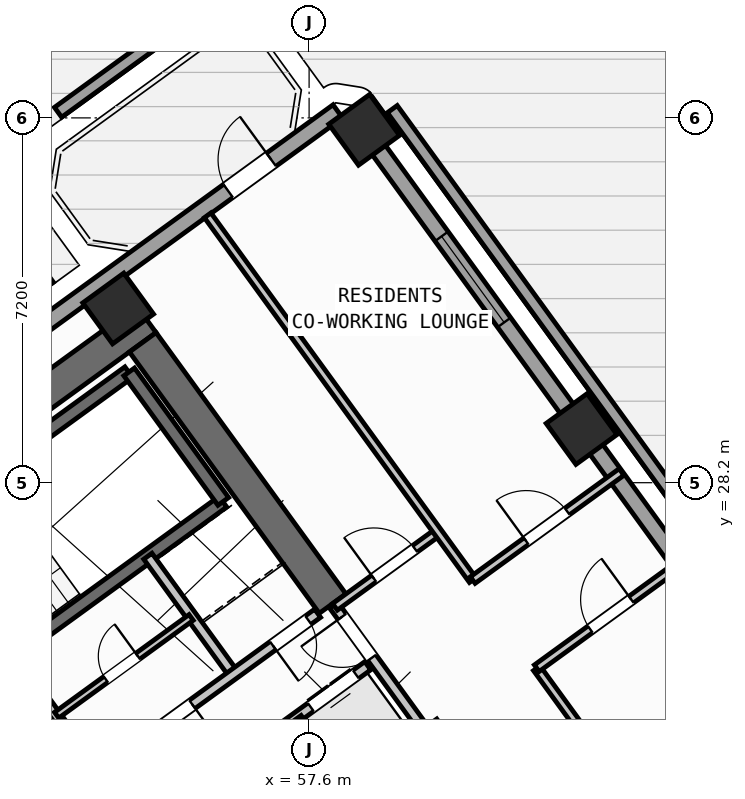
"""IFC4 building model, lengths in metres.
Left out: names, types, materials, properties, quantities, classifications, styles, units other than length and angle.
Written with IfcOpenShell. Run it as: python <this file> out.ifc"""

import sys

from ifc_helpers import new_model, si_unit, direction, frame, frame_2d, origin, origin_2d, place, context, subcontext, project, spatial, rectangle, hollow_rectangle, extrude, source, transform, mapped, element, fill, save


model = new_model("IFC4")
c1 = context("Model", 3, precision=1e-05, world=origin(), true_north=direction((0.0, 1.0)))
c2 = subcontext(c1, "Body", "Model", "MODEL_VIEW")
j1 = project(units=[si_unit("LENGTHUNIT", "METRE"), si_unit("PLANEANGLEUNIT", "RADIAN")], contexts=[c1])
p1 = place(None, origin())
s1 = spatial("IfcSite", under=j1, at=p1, CompositionType="ELEMENT")
p2 = place(p1, origin())
s2 = spatial("IfcBuilding", under=s1, at=p2, CompositionType="ELEMENT")
p3 = place(p2, frame((0.0, 0.0, 24.0)))
s3 = spatial("IfcBuildingStorey", under=s2, at=p3, CompositionType="ELEMENT", Elevation=24.0)
p4 = place(p3, frame((44.325, 24.113, 0.0), z_axis=(0.0, 0.0, 1.0), x_axis=(0.809012664862, 0.58779121131, 0.0)))
e1 = element("IfcWall", 1, at=p4, inside=s3, PredefinedType="SHEAR", context=c2, shape_type="SweptSolid", body=[
    extrude(rectangle(XDim=12.44, YDim=0.65, at=frame_2d((6.22, 0.0))), origin(), (0.0, 0.0, 1.0), 3.35),
])
p5 = place(p3, frame((58.064, 25.813, 0.0), z_axis=(0.0, 0.0, 1.0), x_axis=(-0.58777996584, 0.809020835181, 0.0)))
e2 = element("IfcWall", 2, at=p5, inside=s3, PredefinedType="SHEAR", context=c2, shape_type="SweptSolid", body=[
    extrude(rectangle(XDim=6.375, YDim=0.65, at=frame_2d((3.188, 0.0))), origin(), (0.0, 0.0, 1.0), 3.35),
])
m1 = source(origin(), c2, "Body", "SweptSolid", [
    extrude(hollow_rectangle(XDim=1.0, YDim=1.0, WallThickness=0.04, at=origin_2d()), origin(), (0.0, 0.0, 1.0), 3.6),
])
for number, where, z_axis, x_axis in (
    (3, (53.832, 31.638, 0.0), (0.0, 0.0, 1.0), (0.809, 0.588, 0.0)),
    (4, (62.977, 29.259, 0.0), (0.0, 0.0, 1.0), (0.809, 0.588, 0.0)),
    (5, (58.686, 35.165, 0.0), (0.0, 0.0, 1.0), (0.809, 0.588, 0.0)),
):
    element("IfcColumn", number, at=place(p3, frame(where, z_axis=z_axis, x_axis=x_axis)), inside=s3, PredefinedType="COLUMN", context=c2, shape_type="MappedRepresentation", body=[
        mapped(m1, transform((0.0, 0.0, 0.0), scale=1.0)),
    ])
p6 = place(p3, frame((70.18, 20.52, 0.0), z_axis=(0.0, 0.0, 1.0), x_axis=(-0.587784691012, 0.809017402169, 0.0)))
e6 = element("IfcWall", 6, at=p6, inside=s3, PredefinedType="PARAPET", context=c2, shape_type="SweptSolid", body=[
    extrude(rectangle(XDim=18.608, YDim=0.24, at=frame_2d((9.304, 0.0))), origin(), (0.0, 0.0, 1.0), 1.15),
])
p7 = place(p3, frame((55.143, 37.325, 0.0), z_axis=(0.0, 0.0, 1.0), x_axis=(-0.808999321839, -0.587809575682, 0.0)))
e7 = element("IfcWall", 7, at=p7, inside=s3, PredefinedType="PARAPET", context=c2, shape_type="SweptSolid", body=[
    extrude(rectangle(XDim=3.087, YDim=0.24, at=frame_2d((1.543, 0.0))), origin(), (0.0, 0.0, 1.0), 1.15),
])
p8 = place(p3, frame((52.483, 32.253, 0.0), z_axis=(0.0, 0.0, 1.0), x_axis=(-0.809025796011, -0.58777313769, 0.0)))
e8 = element("IfcWall", 8, at=p8, inside=s3, PredefinedType="PARAPET", context=c2, shape_type="SweptSolid", body=[
    extrude(rectangle(XDim=10.674, YDim=0.24, at=frame_2d((5.337, 0.0))), origin(), (0.0, 0.0, 1.0), 1.15),
])
p9 = place(p3, frame((43.938, 25.192, 0.0), z_axis=(0.0, 0.0, 1.0), x_axis=(0.809016324578, 0.587786174187, 0.0)))
e9 = element("IfcWall", 9, at=p9, inside=s3, PredefinedType="STANDARD", context=c2, shape_type="SweptSolid", body=[
    extrude(rectangle(XDim=17.587, YDim=0.32, at=frame_2d((8.794, 0.0))), origin(), (0.0, 0.0, 1.0), 3.35),
])
p10 = place(p9, frame((14.914, 0.0, 0.0)))
e10 = element("IfcOpeningElement", 10, at=p10, cuts=e9, PredefinedType="OPENING", context=c2, shape_type="SweptSolid", body=[
    extrude(rectangle(XDim=1.05, YDim=2.15, at=frame_2d((0.525, 1.075))), frame((0.0, 0.17, 0.0), z_axis=(0.0, -1.0, 0.0), x_axis=(1.0, 0.0, 0.0)), (0.0, 0.0, 1.0), 0.34),
])
p11 = place(p9, frame((2.169, 0.0, 0.8)))
e11 = element("IfcOpeningElement", 11, at=p11, cuts=e9, PredefinedType="OPENING", context=c2, shape_type="SweptSolid", body=[
    extrude(rectangle(XDim=2.1, YDim=1.55, at=frame_2d((1.05, 0.775))), frame((0.0, 0.17, 0.0), z_axis=(0.0, -1.0, 0.0), x_axis=(1.0, 0.0, 0.0)), (0.0, 0.0, 1.0), 0.34),
])
p12 = place(p9, frame((7.319, 0.0, 0.8)))
e12 = element("IfcOpeningElement", 12, at=p12, cuts=e9, PredefinedType="OPENING", context=c2, shape_type="SweptSolid", body=[
    extrude(rectangle(XDim=2.1, YDim=1.55, at=frame_2d((1.05, 0.775))), frame((0.0, 0.17, 0.0), z_axis=(0.0, -1.0, 0.0), x_axis=(1.0, 0.0, 0.0)), (0.0, 0.0, 1.0), 0.34),
])
p13 = place(p3, frame((58.455, 35.484, 0.0), z_axis=(0.0, 0.0, 1.0), x_axis=(0.587783625747, -0.809018176127, 0.0)))
e13 = element("IfcWall", 13, at=p13, inside=s3, PredefinedType="STANDARD", context=c2, shape_type="SweptSolid", body=[
    extrude(rectangle(XDim=21.587, YDim=0.32, at=frame_2d((10.794, 0.0))), origin(), (0.0, 0.0, 1.0), 2.725),
])
p14 = place(p13, frame((2.994, 0.0, 0.8)))
e14 = element("IfcOpeningElement", 14, at=p14, cuts=e13, PredefinedType="OPENING", context=c2, shape_type="SweptSolid", body=[
    extrude(rectangle(XDim=2.1, YDim=1.55, at=frame_2d((1.05, 0.775))), frame((0.0, 0.17, 0.0), z_axis=(0.0, -1.0, 0.0), x_axis=(1.0, 0.0, 0.0)), (0.0, 0.0, 1.0), 0.34),
])
p15 = place(p13, frame((11.934, 0.0, 0.85)))
e15 = element("IfcOpeningElement", 15, at=p15, cuts=e13, PredefinedType="OPENING", context=c2, shape_type="SweptSolid", body=[
    extrude(rectangle(XDim=1.8, YDim=1.5, at=frame_2d((0.9, 0.75))), frame((0.0, 0.17, 0.0), z_axis=(0.0, -1.0, 0.0), x_axis=(1.0, 0.0, 0.0)), (0.0, 0.0, 1.0), 0.34),
])
p16 = place(p3, frame((48.006, 25.996, 0.0), z_axis=(0.0, 0.0, 1.0), x_axis=(0.80901903764, 0.587782439969, 0.0)))
e16 = element("IfcWall", 16, at=p16, inside=s3, PredefinedType="SHEAR", context=c2, shape_type="SweptSolid", body=[
    extrude(rectangle(XDim=7.46, YDim=0.26, at=frame_2d((3.73, 0.0))), origin(), (0.0, 0.0, 1.0), 3.35),
])
p17 = place(p3, frame((49.863, 23.44, 0.0), z_axis=(0.0, 0.0, 1.0), x_axis=(0.809003474932, 0.587803859759, 0.0)))
e17 = element("IfcWall", 17, at=p17, inside=s3, PredefinedType="SHEAR", context=c2, shape_type="SweptSolid", body=[
    extrude(rectangle(XDim=7.46, YDim=0.26, at=frame_2d((3.73, 0.0))), origin(), (0.0, 0.0, 1.0), 3.35),
])
p18 = place(p17, frame((0.36, 0.0, 0.0)))
e18 = element("IfcOpeningElement", 18, at=p18, cuts=e17, PredefinedType="OPENING", context=c2, shape_type="SweptSolid", body=[
    extrude(rectangle(XDim=0.86, YDim=2.05, at=frame_2d((0.43, 1.025))), frame((0.0, 0.14, 0.0), z_axis=(0.0, -1.0, 0.0), x_axis=(1.0, 0.0, 0.0)), (0.0, 0.0, 1.0), 0.28),
])
p19 = place(p3, frame((55.906, 27.831, 0.0), z_axis=(0.0, 0.0, 1.0), x_axis=(-0.587804123638, 0.809003283204, 0.0)))
e19 = element("IfcWall", 19, at=p19, inside=s3, PredefinedType="SHEAR", context=c2, shape_type="SweptSolid", body=[
    extrude(rectangle(XDim=3.16, YDim=0.26, at=frame_2d((1.58, 0.0))), origin(), (0.0, 0.0, 1.0), 3.35),
])
p20 = place(p3, frame((54.421, 21.436, 0.0), z_axis=(0.0, 0.0, 1.0), x_axis=(0.809013710463, 0.587789772183, 0.0)))
e20 = element("IfcWall", 20, at=p20, inside=s3, PredefinedType="STANDARD", context=c2, shape_type="SweptSolid", body=[
    extrude(rectangle(XDim=5.36, YDim=0.2, at=frame_2d((2.68, 0.0))), origin(), (0.0, 0.0, 1.0), 3.34),
])
p21 = place(p20, frame((0.37, 0.0, 0.0)))
e21 = element("IfcOpeningElement", 21, at=p21, cuts=e20, PredefinedType="OPENING", context=c2, shape_type="SweptSolid", body=[
    extrude(rectangle(XDim=1.1, YDim=2.15, at=frame_2d((0.55, 1.075))), frame((0.0, 0.11, 0.0), z_axis=(0.0, -1.0, 0.0), x_axis=(1.0, 0.0, 0.0)), (0.0, 0.0, 1.0), 0.22),
])
p22 = place(p20, frame((2.17, 0.0, 0.0)))
e22 = element("IfcOpeningElement", 22, at=p22, cuts=e20, PredefinedType="OPENING", context=c2, shape_type="SweptSolid", body=[
    extrude(rectangle(XDim=1.1, YDim=2.15, at=frame_2d((0.55, 1.075))), frame((0.0, 0.11, 0.0), z_axis=(0.0, -1.0, 0.0), x_axis=(1.0, 0.0, 0.0)), (0.0, 0.0, 1.0), 0.22),
])
p23 = place(p20, frame((3.97, 0.0, 0.0)))
e23 = element("IfcOpeningElement", 23, at=p23, cuts=e20, PredefinedType="OPENING", context=c2, shape_type="SweptSolid", body=[
    extrude(rectangle(XDim=1.1, YDim=2.15, at=frame_2d((0.55, 1.075))), frame((0.0, 0.11, 0.0), z_axis=(0.0, -1.0, 0.0), x_axis=(1.0, 0.0, 0.0)), (0.0, 0.0, 1.0), 0.22),
])
p24 = place(p3, frame((58.29, 22.27, 0.0), z_axis=(0.0, 0.0, 1.0), x_axis=(-0.587840865826, 0.808976585857, 0.0)))
e24 = element("IfcWall", 24, at=p24, inside=s3, PredefinedType="STANDARD", context=c2, shape_type="SweptSolid", body=[
    extrude(rectangle(XDim=1.58, YDim=0.2, at=frame_2d((0.79, 0.0))), origin(), (0.0, 0.0, 1.0), 3.34),
])
p25 = place(p3, frame((53.425, 22.468, 0.0), z_axis=(0.0, 0.0, 1.0), x_axis=(-0.5877230039, 0.809062216821, 0.0)))
e25 = element("IfcWall", 25, at=p25, inside=s3, PredefinedType="STANDARD", context=c2, shape_type="SweptSolid", body=[
    extrude(rectangle(XDim=2.88, YDim=0.2, at=frame_2d((1.44, 0.0))), origin(), (0.0, 0.0, 1.0), 3.34),
])
p26 = place(p3, frame((56.111, 24.419, 0.0), z_axis=(0.0, 0.0, 1.0), x_axis=(-0.58777848983, 0.809021907548, 0.0)))
e26 = element("IfcWall", 26, at=p26, inside=s3, PredefinedType="STANDARD", context=c2, shape_type="SweptSolid", body=[
    extrude(rectangle(XDim=2.88, YDim=0.2, at=frame_2d((1.44, 0.0))), origin(), (0.0, 0.0, 1.0), 3.34),
])
p27 = place(p3, frame((53.425, 22.468, 0.0), z_axis=(0.0, 0.0, 1.0), x_axis=(0.80902705128, 0.587771409902, 0.0)))
e27 = element("IfcWall", 27, at=p27, inside=s3, PredefinedType="STANDARD", context=c2, shape_type="SweptSolid", body=[
    extrude(rectangle(XDim=5.368, YDim=0.2, at=frame_2d((2.684, 0.0))), origin(), (0.0, 0.0, 1.0), 3.34),
])
p28 = place(p27, frame((4.28, 0.0, 0.0)))
e28 = element("IfcOpeningElement", 28, at=p28, cuts=e27, PredefinedType="OPENING", context=c2, shape_type="SweptSolid", body=[
    extrude(rectangle(XDim=0.86, YDim=2.05, at=frame_2d((0.43, 1.025))), frame((0.0, 0.11, 0.0), z_axis=(0.0, -1.0, 0.0), x_axis=(1.0, 0.0, 0.0)), (0.0, 0.0, 1.0), 0.22),
])
p29 = place(p27, frame((1.45, 0.0, 0.0)))
e29 = element("IfcOpeningElement", 29, at=p29, cuts=e27, PredefinedType="OPENING", context=c2, shape_type="SweptSolid", body=[
    extrude(rectangle(XDim=0.86, YDim=2.05, at=frame_2d((0.43, 1.025))), frame((0.0, 0.11, 0.0), z_axis=(0.0, -1.0, 0.0), x_axis=(1.0, 0.0, 0.0)), (0.0, 0.0, 1.0), 0.22),
])
p30 = place(p3, frame((52.618, 23.612, 0.0), z_axis=(0.0, 0.0, 1.0), x_axis=(0.809009587469, 0.587795446889, 0.0)))
e30 = element("IfcWall", 30, at=p30, inside=s3, PredefinedType="PLUMBINGWALL", context=c2, shape_type="SweptSolid", body=[
    extrude(rectangle(XDim=3.28, YDim=0.14, at=frame_2d((1.64, 0.0))), origin(), (0.0, 0.0, 1.0), 3.34),
])
p31 = place(p30, frame((1.2, 0.0, 0.0)))
e31 = element("IfcOpeningElement", 31, at=p31, cuts=e30, PredefinedType="OPENING", context=c2, shape_type="SweptSolid", body=[
    extrude(rectangle(XDim=0.78, YDim=2.05, at=frame_2d((0.39, 1.025))), frame((0.0, 0.08, 0.0), z_axis=(0.0, -1.0, 0.0), x_axis=(1.0, 0.0, 0.0)), (0.0, 0.0, 1.0), 0.16),
])
p32 = place(p3, frame((59.827, 23.386, 0.0), z_axis=(0.0, 0.0, 1.0), x_axis=(-0.587803840107, 0.809003489211, 0.0)))
e32 = element("IfcWall", 32, at=p32, inside=s3, PredefinedType="STANDARD", context=c2, shape_type="SweptSolid", body=[
    extrude(rectangle(XDim=2.96, YDim=0.2, at=frame_2d((1.48, 0.0))), origin(), (0.0, 0.0, 1.0), 3.34),
])
p33 = place(p32, frame((1.68, 0.0, 0.0)))
e33 = element("IfcOpeningElement", 33, at=p33, cuts=e32, PredefinedType="OPENING", context=c2, shape_type="SweptSolid", body=[
    extrude(rectangle(XDim=1.0, YDim=2.1, at=frame_2d((0.5, 1.05))), frame((0.0, 0.11, 0.0), z_axis=(0.0, -1.0, 0.0), x_axis=(1.0, 0.0, 0.0)), (0.0, 0.0, 1.0), 0.22),
])
p34 = place(p3, frame((58.111, 25.749, 0.0), z_axis=(0.0, 0.0, 1.0), x_axis=(0.809000999347, 0.58780726693, 0.0)))
e34 = element("IfcWall", 34, at=p34, inside=s3, PredefinedType="PARTITIONING", context=c2, shape_type="SweptSolid", body=[
    extrude(rectangle(XDim=2.51, YDim=0.16, at=frame_2d((1.255, 0.0))), origin(), (0.0, 0.0, 1.0), 2.725),
])
p35 = place(p34, frame((0.95, 0.0, 0.0)))
e35 = element("IfcOpeningElement", 35, at=p35, cuts=e34, PredefinedType="OPENING", context=c2, shape_type="SweptSolid", body=[
    extrude(rectangle(XDim=1.0, YDim=2.1, at=frame_2d((0.5, 1.05))), frame((0.0, 0.09, 0.0), z_axis=(0.0, -1.0, 0.0), x_axis=(1.0, 0.0, 0.0)), (0.0, 0.0, 1.0), 0.18),
])
p36 = place(p3, frame((68.353, 15.922, 0.0), z_axis=(0.0, 0.0, 1.0), x_axis=(-0.587783168305, 0.809018508476, 0.0)))
e36 = element("IfcWall", 36, at=p36, inside=s3, PredefinedType="PARTITIONING", context=c2, shape_type="SweptSolid", body=[
    extrude(rectangle(XDim=10.65, YDim=0.16, at=frame_2d((5.325, 0.0))), origin(), (0.0, 0.0, 1.0), 3.34),
])
p37 = place(p3, frame((60.829, 26.278, 0.0), z_axis=(0.0, 0.0, 1.0), x_axis=(-0.587781800813, 0.80901950201, 0.0)))
e37 = element("IfcWall", 37, at=p37, inside=s3, PredefinedType="PARTITIONING", context=c2, shape_type="SweptSolid", body=[
    extrude(rectangle(XDim=8.9, YDim=0.16, at=frame_2d((4.45, 0.0))), origin(), (0.0, 0.0, 1.0), 3.34),
])
p38 = place(p3, frame((62.093, 24.538, 0.0), z_axis=(0.0, 0.0, 1.0), x_axis=(0.809035546126, 0.58775971715, 0.0)))
e38 = element("IfcWall", 38, at=p38, inside=s3, PredefinedType="PARTITIONING", context=c2, shape_type="SweptSolid", body=[
    extrude(rectangle(XDim=3.63, YDim=0.16, at=frame_2d((1.815, 0.0))), origin(), (0.0, 0.0, 1.0), 3.34),
])
p39 = place(p38, frame((1.305, 0.0, 0.0)))
e39 = element("IfcOpeningElement", 39, at=p39, cuts=e38, PredefinedType="OPENING", context=c2, shape_type="SweptSolid", body=[
    extrude(rectangle(XDim=1.0, YDim=2.1, at=frame_2d((0.5, 1.05))), frame((0.0, 0.09, 0.0), z_axis=(0.0, -1.0, 0.0), x_axis=(1.0, 0.0, 0.0)), (0.0, 0.0, 1.0), 0.18),
])
p40 = place(p3, frame((60.829, 26.278, 0.0), z_axis=(0.0, 0.0, 1.0), x_axis=(0.809003564202, 0.587803736896, 0.0)))
e40 = element("IfcWall", 40, at=p40, inside=s3, PredefinedType="PARTITIONING", context=c2, shape_type="SweptSolid", body=[
    extrude(rectangle(XDim=3.63, YDim=0.16, at=frame_2d((1.815, 0.0))), origin(), (0.0, 0.0, 1.0), 3.34),
])
p41 = place(p40, frame((1.305, 0.0, 0.0)))
e41 = element("IfcOpeningElement", 41, at=p41, cuts=e40, PredefinedType="OPENING", context=c2, shape_type="SweptSolid", body=[
    extrude(rectangle(XDim=1.0, YDim=2.1, at=frame_2d((0.5, 1.05))), frame((0.0, 0.09, 0.0), z_axis=(0.0, -1.0, 0.0), x_axis=(1.0, 0.0, 0.0)), (0.0, 0.0, 1.0), 0.18),
])
m2 = source(origin(), c2, "Body", "SweptSolid", [
    extrude(rectangle(XDim=1.05, YDim=2.15, at=frame_2d((0.525, 1.075))), frame((0.0, 0.025, 0.0), z_axis=(0.0, -1.0, 0.0), x_axis=(1.0, 0.0, 0.0)), (0.0, 0.0, 1.0), 0.05),
])
p42 = place(p10, origin())
e42 = element("IfcDoor", 42, at=p42, inside=s3, OperationType="SINGLE_SWING_RIGHT", PredefinedType="DOOR", context=c2, shape_type="MappedRepresentation", body=[
    mapped(m2, transform((0.0, 0.0, 0.0), scale=1.0)),
])
fill(e10, e42)
m3 = source(origin(), c2, "Body", "SweptSolid", [
    extrude(rectangle(XDim=2.1, YDim=1.55, at=frame_2d((1.05, 0.775))), frame((0.0, 0.03, 0.0), z_axis=(0.0, -1.0, 0.0), x_axis=(1.0, 0.0, 0.0)), (0.0, 0.0, 1.0), 0.06),
])
p43 = place(p14, origin())
e43 = element("IfcWindow", 43, at=p43, inside=s3, PartitioningType="SINGLE_PANEL", PredefinedType="WINDOW", context=c2, shape_type="MappedRepresentation", body=[
    mapped(m3, transform((0.0, 0.0, 0.0), scale=1.0)),
])
fill(e14, e43)
m4 = source(origin(), c2, "Body", "SweptSolid", [
    extrude(rectangle(XDim=1.1, YDim=2.15, at=frame_2d((0.55, 1.075))), frame((0.0, 0.025, 0.0), z_axis=(0.0, -1.0, 0.0), x_axis=(1.0, 0.0, 0.0)), (0.0, 0.0, 1.0), 0.05),
])
p44 = place(p23, origin())
e44 = element("IfcDoor", 44, at=p44, inside=s3, OperationType="DOUBLE_DOOR_SLIDING", PredefinedType="DOOR", context=c2, shape_type="MappedRepresentation", body=[
    mapped(m4, transform((0.0, 0.0, 0.0), scale=1.0)),
])
fill(e23, e44)
m5 = source(origin(), c2, "Body", "SweptSolid", [
    extrude(rectangle(XDim=0.86, YDim=2.05, at=frame_2d((0.43, 1.025))), frame((0.0, 0.025, 0.0), z_axis=(0.0, -1.0, 0.0), x_axis=(1.0, 0.0, 0.0)), (0.0, 0.0, 1.0), 0.05),
])
p45 = place(p28, frame((0.86, 0.0, 0.0), z_axis=(0.0, 0.0, 1.0), x_axis=(-1.0, 0.0, 0.0)))
e45 = element("IfcDoor", 45, at=p45, inside=s3, OperationType="SINGLE_SWING_RIGHT", PredefinedType="DOOR", context=c2, shape_type="MappedRepresentation", body=[
    mapped(m5, transform((0.0, 0.0, 0.0), scale=1.0)),
])
fill(e28, e45)
p46 = place(p29, frame((0.86, 0.0, 0.0), z_axis=(0.0, 0.0, 1.0), x_axis=(-1.0, 0.0, 0.0)))
e46 = element("IfcDoor", 46, at=p46, inside=s3, OperationType="SINGLE_SWING_LEFT", PredefinedType="DOOR", context=c2, shape_type="MappedRepresentation", body=[
    mapped(m5, transform((0.0, 0.0, 0.0), scale=1.0)),
])
fill(e29, e46)
m6 = source(origin(), c2, "Body", "SweptSolid", [
    extrude(rectangle(XDim=0.78, YDim=2.05, at=frame_2d((0.39, 1.025))), frame((0.0, 0.025, 0.0), z_axis=(0.0, -1.0, 0.0), x_axis=(1.0, 0.0, 0.0)), (0.0, 0.0, 1.0), 0.05),
])
p47 = place(p31, origin())
e47 = element("IfcDoor", 47, at=p47, inside=s3, OperationType="SINGLE_SWING_RIGHT", PredefinedType="DOOR", context=c2, shape_type="MappedRepresentation", body=[
    mapped(m6, transform((0.0, 0.0, 0.0), scale=1.0)),
])
fill(e31, e47)
m7 = source(origin(), c2, "Body", "SweptSolid", [
    extrude(rectangle(XDim=1.0, YDim=2.1, at=frame_2d((0.5, 1.05))), frame((0.0, 0.025, 0.0), z_axis=(0.0, -1.0, 0.0), x_axis=(1.0, 0.0, 0.0)), (0.0, 0.0, 1.0), 0.05),
])
p48 = place(p35, origin())
e48 = element("IfcDoor", 48, at=p48, inside=s3, OperationType="SINGLE_SWING_LEFT", PredefinedType="DOOR", context=c2, shape_type="MappedRepresentation", body=[
    mapped(m7, transform((0.0, 0.0, 0.0), scale=1.0)),
])
fill(e35, e48)
p49 = place(p33, origin())
e49 = element("IfcDoor", 49, at=p49, inside=s3, OperationType="SINGLE_SWING_RIGHT", PredefinedType="DOOR", context=c2, shape_type="MappedRepresentation", body=[
    mapped(m7, transform((0.0, 0.0, 0.0), scale=1.0)),
])
fill(e33, e49)
p50 = place(p41, origin())
e50 = element("IfcDoor", 50, at=p50, inside=s3, OperationType="SINGLE_SWING_LEFT", PredefinedType="DOOR", context=c2, shape_type="MappedRepresentation", body=[
    mapped(m7, transform((0.0, 0.0, 0.0), scale=1.0)),
])
fill(e41, e50)
p51 = place(p39, origin())
e51 = element("IfcDoor", 51, at=p51, inside=s3, OperationType="SINGLE_SWING_RIGHT", PredefinedType="DOOR", context=c2, shape_type="MappedRepresentation", body=[
    mapped(m7, transform((0.0, 0.0, 0.0), scale=1.0)),
])
fill(e39, e51)
save(model, sys.argv[1])
